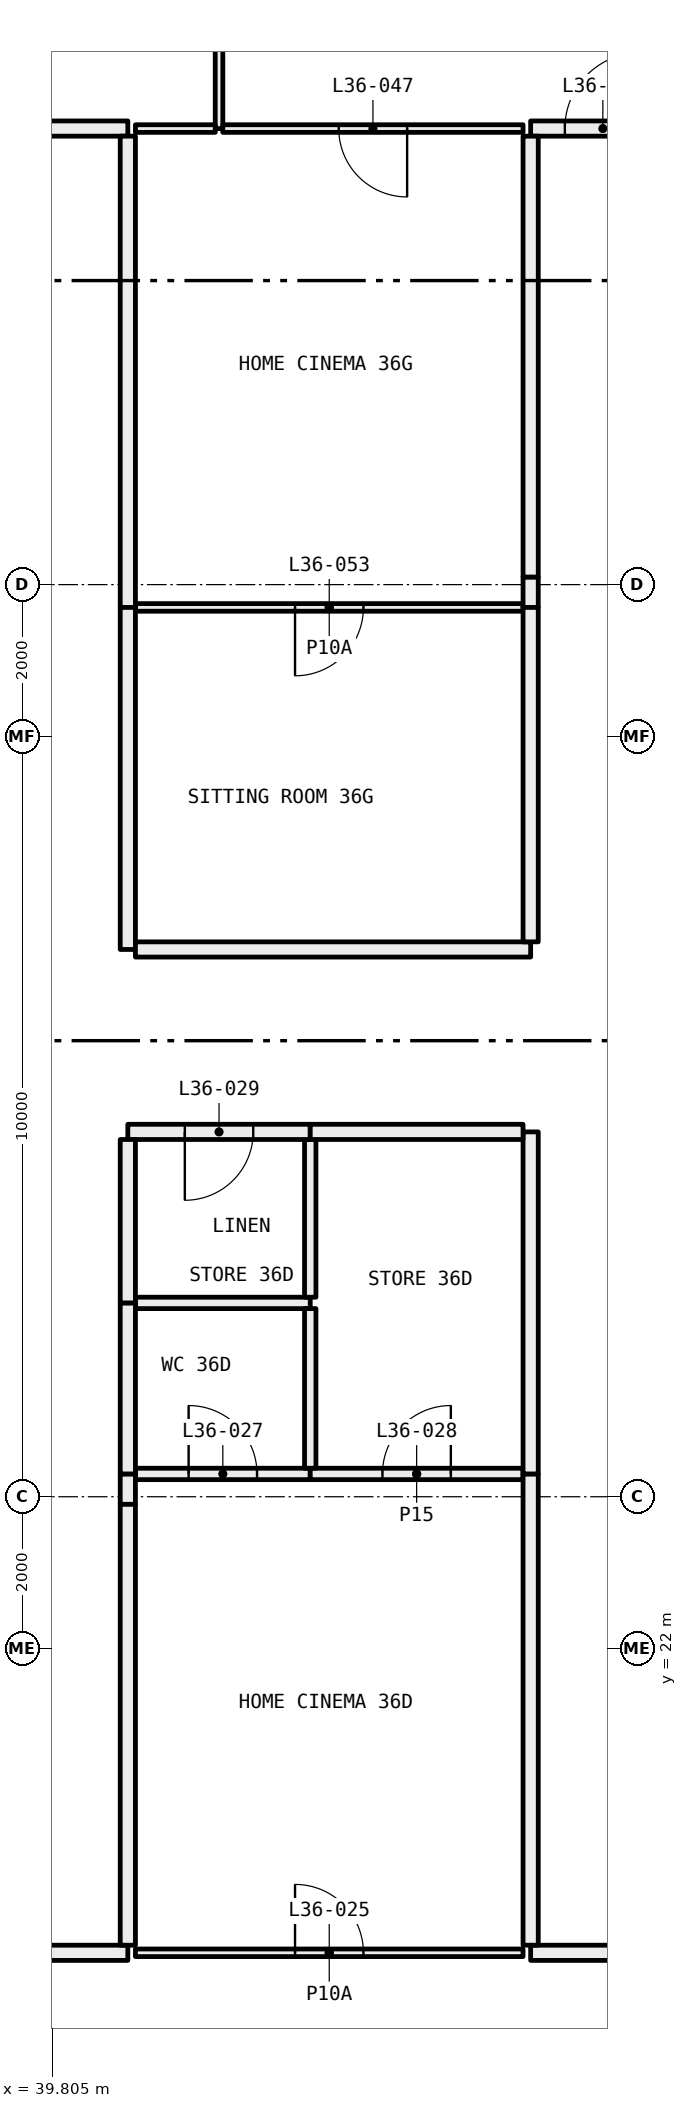
"""IFC4 building model, lengths in metres.
Left out: names, types, materials, properties, quantities, classifications, styles, units other than length and angle.
Written with IfcOpenShell. Run it as: python <this file> out.ifc"""

import sys

from ifc_helpers import new_model, si_unit, direction, frame, frame_2d, origin, place, context, subcontext, project, spatial, rectangle, extrude, element, fill, save


model = new_model("IFC4")
c1 = context("Model", 3, precision=1e-05, world=origin(), true_north=direction((0.0, 1.0)))
c2 = subcontext(c1, "Body", "Model", "MODEL_VIEW")
j1 = project(units=[si_unit("LENGTHUNIT", "METRE"), si_unit("PLANEANGLEUNIT", "RADIAN")], contexts=[c1])
p1 = place(None, origin())
s1 = spatial("IfcSite", under=j1, at=p1, CompositionType="ELEMENT")
p2 = place(p1, origin())
s2 = spatial("IfcBuilding", under=s1, at=p2, CompositionType="ELEMENT")
p3 = place(p2, frame((0.0, 0.0, 138.0)))
s3 = spatial("IfcBuildingStorey", under=s2, at=p3, CompositionType="ELEMENT", Elevation=138.0)
p4 = place(p3, frame((46.0, 18.0, 0.0), z_axis=(0.0, 0.0, 1.0), x_axis=(-1.0, 0.0, 0.0)))
e1 = element("IfcWall", 1, at=p4, inside=s3, PredefinedType="PARTITIONING", context=c2, shape_type="SweptSolid", body=[
    extrude(rectangle(XDim=5.1, YDim=0.1, at=frame_2d((2.55, 0.0))), origin(), (0.0, 0.0, 1.0), 3.05),
])
p5 = place(p4, frame((2.1, 0.0, 0.0)))
e2 = element("IfcOpeningElement", 2, at=p5, cuts=e1, PredefinedType="OPENING", context=c2, shape_type="SweptSolid", body=[
    extrude(rectangle(XDim=0.9, YDim=2.1, at=frame_2d((0.45, 1.05))), frame((0.0, 0.06, 0.0), z_axis=(0.0, -1.0, 0.0), x_axis=(1.0, 0.0, 0.0)), (0.0, 0.0, 1.0), 0.12),
])
p6 = place(p3, frame((40.8, 18.0, 0.0), z_axis=(0.0, 0.0, 1.0), x_axis=(-1.0, 0.0, 0.0)))
e3 = element("IfcWall", 3, at=p6, inside=s3, PredefinedType="PARTITIONING", context=c2, shape_type="SweptSolid", body=[
    extrude(rectangle(XDim=2.3, YDim=0.2, at=frame_2d((1.15, 0.0))), origin(), (0.0, 0.0, 1.0), 3.05),
])
p7 = place(p3, frame((48.0, 18.0, 0.0), z_axis=(0.0, 0.0, 1.0), x_axis=(-1.0, 0.0, 0.0)))
e4 = element("IfcWall", 4, at=p7, inside=s3, PredefinedType="PARTITIONING", context=c2, shape_type="SweptSolid", body=[
    extrude(rectangle(XDim=1.9, YDim=0.2, at=frame_2d((0.95, 0.0))), origin(), (0.0, 0.0, 1.0), 3.05),
])
p8 = place(p3, frame((43.2, 24.3, 0.0), z_axis=(0.0, 0.0, 1.0), x_axis=(-1.0, 0.0, 0.0)))
e5 = element("IfcWall", 5, at=p8, inside=s3, PredefinedType="PARTITIONING", context=c2, shape_type="SweptSolid", body=[
    extrude(rectangle(XDim=2.3, YDim=0.15, at=frame_2d((1.15, 0.0))), origin(), (0.0, 0.0, 1.0), 3.05),
])
p9 = place(p8, frame((0.7, 0.0, 0.0)))
e6 = element("IfcOpeningElement", 6, at=p9, cuts=e5, PredefinedType="OPENING", context=c2, shape_type="SweptSolid", body=[
    extrude(rectangle(XDim=0.9, YDim=2.1, at=frame_2d((0.45, 1.05))), frame((0.0, 0.085, 0.0), z_axis=(0.0, -1.0, 0.0), x_axis=(1.0, 0.0, 0.0)), (0.0, 0.0, 1.0), 0.17),
])
p10 = place(p3, frame((46.0, 24.3, 0.0), z_axis=(0.0, 0.0, 1.0), x_axis=(-1.0, 0.0, 0.0)))
e7 = element("IfcWall", 7, at=p10, inside=s3, PredefinedType="PARTITIONING", context=c2, shape_type="SweptSolid", body=[
    extrude(rectangle(XDim=2.8, YDim=0.15, at=frame_2d((1.4, 0.0))), origin(), (0.0, 0.0, 1.0), 3.05),
])
p11 = place(p10, frame((0.95, 0.0, 0.0)))
e8 = element("IfcOpeningElement", 8, at=p11, cuts=e7, PredefinedType="OPENING", context=c2, shape_type="SweptSolid", body=[
    extrude(rectangle(XDim=0.9, YDim=2.1, at=frame_2d((0.45, 1.05))), frame((0.0, 0.085, 0.0), z_axis=(0.0, -1.0, 0.0), x_axis=(1.0, 0.0, 0.0)), (0.0, 0.0, 1.0), 0.17),
])
p12 = place(p3, frame((40.8, 24.3, 0.0), z_axis=(0.0, 0.0, 1.0), x_axis=(0.0, -1.0, 0.0)))
e9 = element("IfcWall", 9, at=p12, inside=s3, PredefinedType="PARTITIONING", context=c2, shape_type="SweptSolid", body=[
    extrude(rectangle(XDim=0.4, YDim=0.2, at=frame_2d((0.2, 0.0))), origin(), (0.0, 0.0, 1.0), 2.45),
])
p13 = place(p3, frame((40.8, 23.9, 0.0), z_axis=(0.0, 0.0, 1.0), x_axis=(0.0, -1.0, 0.0)))
e10 = element("IfcWall", 10, at=p13, inside=s3, PredefinedType="PARTITIONING", context=c2, shape_type="SweptSolid", body=[
    extrude(rectangle(XDim=5.8, YDim=0.2, at=frame_2d((2.9, 0.0))), origin(), (0.0, 0.0, 1.0), 3.05),
])
p14 = place(p3, frame((46.1, 18.1, 0.0), z_axis=(0.0, 0.0, 1.0), x_axis=(0.0, 1.0, 0.0)))
e11 = element("IfcWall", 11, at=p14, inside=s3, PredefinedType="PARTITIONING", context=c2, shape_type="SweptSolid", body=[
    extrude(rectangle(XDim=6.2, YDim=0.2, at=frame_2d((3.1, 0.0))), origin(), (0.0, 0.0, 1.0), 2.45),
])
p15 = place(p3, frame((43.2, 26.55, 0.0), z_axis=(0.0, 0.0, 1.0), x_axis=(-1.0, 0.0, 0.0)))
e12 = element("IfcWall", 12, at=p15, inside=s3, PredefinedType="PARTITIONING", context=c2, shape_type="SweptSolid", body=[
    extrude(rectangle(XDim=2.3, YDim=0.15, at=frame_2d((1.15, 0.0))), origin(), (0.0, 0.0, 1.0), 3.05),
])
p16 = place(p3, frame((43.2, 24.375, 0.0), z_axis=(0.0, 0.0, 1.0), x_axis=(0.0, 1.0, 0.0)))
e13 = element("IfcWall", 13, at=p16, inside=s3, PredefinedType="PARTITIONING", context=c2, shape_type="SweptSolid", body=[
    extrude(rectangle(XDim=2.1, YDim=0.15, at=frame_2d((1.05, 0.0))), origin(), (0.0, 0.0, 1.0), 3.05),
])
p17 = place(p3, frame((40.8, 26.55, 0.0), z_axis=(0.0, 0.0, 1.0), x_axis=(0.0, -1.0, 0.0)))
e14 = element("IfcWall", 14, at=p17, inside=s3, PredefinedType="PARTITIONING", context=c2, shape_type="SweptSolid", body=[
    extrude(rectangle(XDim=2.25, YDim=0.2, at=frame_2d((1.125, 0.0))), origin(), (0.0, 0.0, 1.0), 3.05),
])
p18 = place(p3, frame((43.2, 26.625, 0.0), z_axis=(0.0, 0.0, 1.0), x_axis=(0.0, 1.0, 0.0)))
e15 = element("IfcWall", 15, at=p18, inside=s3, PredefinedType="PARTITIONING", context=c2, shape_type="SweptSolid", body=[
    extrude(rectangle(XDim=2.075, YDim=0.15, at=frame_2d((1.038, 0.0))), origin(), (0.0, 0.0, 1.0), 3.05),
])
p19 = place(p3, frame((43.2, 28.8, 0.0), z_axis=(0.0, 0.0, 1.0), x_axis=(-1.0, 0.0, 0.0)))
e16 = element("IfcWall", 16, at=p19, inside=s3, PredefinedType="PARTITIONING", context=c2, shape_type="SweptSolid", body=[
    extrude(rectangle(XDim=2.4, YDim=0.2, at=frame_2d((1.2, 0.0))), origin(), (0.0, 0.0, 1.0), 3.05),
])
p20 = place(p19, frame((0.75, 0.0, 0.0)))
e17 = element("IfcOpeningElement", 17, at=p20, cuts=e16, PredefinedType="OPENING", context=c2, shape_type="SweptSolid", body=[
    extrude(rectangle(XDim=0.9, YDim=2.1, at=frame_2d((0.45, 1.05))), frame((0.0, 0.11, 0.0), z_axis=(0.0, -1.0, 0.0), x_axis=(1.0, 0.0, 0.0)), (0.0, 0.0, 1.0), 0.22),
])
p21 = place(p3, frame((40.8, 28.7, 0.0), z_axis=(0.0, 0.0, 1.0), x_axis=(0.0, -1.0, 0.0)))
e18 = element("IfcWall", 18, at=p21, inside=s3, PredefinedType="PARTITIONING", context=c2, shape_type="SweptSolid", body=[
    extrude(rectangle(XDim=2.15, YDim=0.2, at=frame_2d((1.075, 0.0))), origin(), (0.0, 0.0, 1.0), 3.05),
])
p22 = place(p3, frame((46.1, 24.3, 0.0), z_axis=(0.0, 0.0, 1.0), x_axis=(0.0, 1.0, 0.0)))
e19 = element("IfcWall", 19, at=p22, inside=s3, PredefinedType="PARTITIONING", context=c2, shape_type="SweptSolid", body=[
    extrude(rectangle(XDim=4.5, YDim=0.2, at=frame_2d((2.25, 0.0))), origin(), (0.0, 0.0, 1.0), 3.05),
])
p23 = place(p3, frame((46.0, 28.8, 0.0), z_axis=(0.0, 0.0, 1.0), x_axis=(-1.0, 0.0, 0.0)))
e20 = element("IfcWall", 20, at=p23, inside=s3, PredefinedType="PARTITIONING", context=c2, shape_type="SweptSolid", body=[
    extrude(rectangle(XDim=2.8, YDim=0.2, at=frame_2d((1.4, 0.0))), origin(), (0.0, 0.0, 1.0), 3.05),
])
p24 = place(p3, frame((42.0, 42.0, 0.0), z_axis=(0.0, 0.0, 1.0), x_axis=(0.0, 1.0, 0.0)))
e21 = element("IfcWall", 21, at=p24, inside=s3, PredefinedType="PARTITIONING", context=c2, shape_type="SweptSolid", body=[
    extrude(rectangle(XDim=2.95, YDim=0.1, at=frame_2d((1.475, 0.0))), origin(), (0.0, 0.0, 1.0), 3.05),
])
p25 = place(p24, frame((1.025, 0.0, 0.0)))
e22 = element("IfcOpeningElement", 22, at=p25, cuts=e21, PredefinedType="OPENING", context=c2, shape_type="SweptSolid", body=[
    extrude(rectangle(XDim=0.9, YDim=2.1, at=frame_2d((0.45, 1.05))), frame((0.0, 0.06, 0.0), z_axis=(0.0, -1.0, 0.0), x_axis=(1.0, 0.0, 0.0)), (0.0, 0.0, 1.0), 0.12),
])
p26 = place(p3, frame((40.9, 42.0, 0.0), z_axis=(0.0, 0.0, 1.0), x_axis=(1.0, 0.0, 0.0)))
e23 = element("IfcWall", 23, at=p26, inside=s3, PredefinedType="PARTITIONING", context=c2, shape_type="SweptSolid", body=[
    extrude(rectangle(XDim=1.05, YDim=0.1, at=frame_2d((0.525, 0.0))), origin(), (0.0, 0.0, 1.0), 3.05),
])
p27 = place(p3, frame((38.4, 42.0, 0.0), z_axis=(0.0, 0.0, 1.0), x_axis=(1.0, 0.0, 0.0)))
e24 = element("IfcWall", 24, at=p27, inside=s3, PredefinedType="PARTITIONING", context=c2, shape_type="SweptSolid", body=[
    extrude(rectangle(XDim=2.4, YDim=0.2, at=frame_2d((1.2, 0.0))), origin(), (0.0, 0.0, 1.0), 3.05),
])
p28 = place(p3, frame((42.05, 42.0, 0.0), z_axis=(0.0, 0.0, 1.0), x_axis=(1.0, 0.0, 0.0)))
e25 = element("IfcWall", 25, at=p28, inside=s3, PredefinedType="PARTITIONING", context=c2, shape_type="SweptSolid", body=[
    extrude(rectangle(XDim=3.95, YDim=0.1, at=frame_2d((1.975, 0.0))), origin(), (0.0, 0.0, 1.0), 3.05),
])
p29 = place(p28, frame((1.525, 0.0, 0.0)))
e26 = element("IfcOpeningElement", 26, at=p29, cuts=e25, PredefinedType="OPENING", context=c2, shape_type="SweptSolid", body=[
    extrude(rectangle(XDim=0.9, YDim=2.1, at=frame_2d((0.45, 1.05))), frame((0.0, 0.06, 0.0), z_axis=(0.0, -1.0, 0.0), x_axis=(1.0, 0.0, 0.0)), (0.0, 0.0, 1.0), 0.12),
])
p30 = place(p3, frame((46.1, 42.0, 0.0), z_axis=(0.0, 0.0, 1.0), x_axis=(1.0, 0.0, 0.0)))
e27 = element("IfcWall", 27, at=p30, inside=s3, PredefinedType="PARTITIONING", context=c2, shape_type="SweptSolid", body=[
    extrude(rectangle(XDim=1.9, YDim=0.2, at=frame_2d((0.95, 0.0))), origin(), (0.0, 0.0, 1.0), 3.05),
])
p31 = place(p30, frame((0.45, 0.0, 0.0)))
e28 = element("IfcOpeningElement", 28, at=p31, cuts=e27, PredefinedType="OPENING", context=c2, shape_type="SweptSolid", body=[
    extrude(rectangle(XDim=1.0, YDim=2.1, at=frame_2d((0.5, 1.05))), frame((0.0, 0.11, 0.0), z_axis=(0.0, -1.0, 0.0), x_axis=(1.0, 0.0, 0.0)), (0.0, 0.0, 1.0), 0.22),
])
p32 = place(p3, frame((40.9, 35.7, 0.0), z_axis=(0.0, 0.0, 1.0), x_axis=(1.0, 0.0, 0.0)))
e29 = element("IfcWall", 29, at=p32, inside=s3, PredefinedType="PARTITIONING", context=c2, shape_type="SweptSolid", body=[
    extrude(rectangle(XDim=5.1, YDim=0.1, at=frame_2d((2.55, 0.0))), origin(), (0.0, 0.0, 1.0), 3.05),
])
p33 = place(p32, frame((2.1, 0.0, 0.0)))
e30 = element("IfcOpeningElement", 30, at=p33, cuts=e29, PredefinedType="OPENING", context=c2, shape_type="SweptSolid", body=[
    extrude(rectangle(XDim=0.9, YDim=2.1, at=frame_2d((0.45, 1.05))), frame((0.0, 0.06, 0.0), z_axis=(0.0, -1.0, 0.0), x_axis=(1.0, 0.0, 0.0)), (0.0, 0.0, 1.0), 0.12),
])
p34 = place(p3, frame((40.8, 41.9, 0.0), z_axis=(0.0, 0.0, 1.0), x_axis=(0.0, -1.0, 0.0)))
e31 = element("IfcWall", 31, at=p34, inside=s3, PredefinedType="PARTITIONING", context=c2, shape_type="SweptSolid", body=[
    extrude(rectangle(XDim=6.2, YDim=0.2, at=frame_2d((3.1, 0.0))), origin(), (0.0, 0.0, 1.0), 2.45),
])
p35 = place(p3, frame((46.1, 35.7, 0.0), z_axis=(0.0, 0.0, 1.0), x_axis=(0.0, 1.0, 0.0)))
e32 = element("IfcWall", 32, at=p35, inside=s3, PredefinedType="PARTITIONING", context=c2, shape_type="SweptSolid", body=[
    extrude(rectangle(XDim=0.4, YDim=0.2, at=frame_2d((0.2, 0.0))), origin(), (0.0, 0.0, 1.0), 2.45),
])
p36 = place(p3, frame((46.1, 36.1, 0.0), z_axis=(0.0, 0.0, 1.0), x_axis=(0.0, 1.0, 0.0)))
e33 = element("IfcWall", 33, at=p36, inside=s3, PredefinedType="PARTITIONING", context=c2, shape_type="SweptSolid", body=[
    extrude(rectangle(XDim=5.8, YDim=0.2, at=frame_2d((2.9, 0.0))), origin(), (0.0, 0.0, 1.0), 3.05),
])
p37 = place(p3, frame((40.8, 35.7, 0.0), z_axis=(0.0, 0.0, 1.0), x_axis=(0.0, -1.0, 0.0)))
e34 = element("IfcWall", 34, at=p37, inside=s3, PredefinedType="PARTITIONING", context=c2, shape_type="SweptSolid", body=[
    extrude(rectangle(XDim=4.5, YDim=0.2, at=frame_2d((2.25, 0.0))), origin(), (0.0, 0.0, 1.0), 3.05),
])
p38 = place(p3, frame((40.9, 31.2, 0.0), z_axis=(0.0, 0.0, 1.0), x_axis=(1.0, 0.0, 0.0)))
e35 = element("IfcWall", 35, at=p38, inside=s3, PredefinedType="PARTITIONING", context=c2, shape_type="SweptSolid", body=[
    extrude(rectangle(XDim=5.2, YDim=0.2, at=frame_2d((2.6, 0.0))), origin(), (0.0, 0.0, 1.0), 3.05),
])
p39 = place(p3, frame((46.1, 31.3, 0.0), z_axis=(0.0, 0.0, 1.0), x_axis=(0.0, 1.0, 0.0)))
e36 = element("IfcWall", 36, at=p39, inside=s3, PredefinedType="PARTITIONING", context=c2, shape_type="SweptSolid", body=[
    extrude(rectangle(XDim=4.4, YDim=0.2, at=frame_2d((2.2, 0.0))), origin(), (0.0, 0.0, 1.0), 3.05),
])
p40 = place(p5, frame((0.9, 0.0, 0.0), x_axis=(-1.0, 0.0, 0.0)))
e37 = element("IfcDoor", 37, at=p40, inside=s3, OperationType="SINGLE_SWING_RIGHT", PredefinedType="DOOR", context=c2, shape_type="SweptSolid", body=[
    extrude(rectangle(XDim=0.9, YDim=2.1, at=frame_2d((0.45, 1.05))), frame((0.0, 0.025, 0.0), z_axis=(0.0, -1.0, 0.0), x_axis=(1.0, 0.0, 0.0)), (0.0, 0.0, 1.0), 0.05),
])
fill(e2, e37)
p41 = place(p9, frame((0.9, 0.0, 0.0), x_axis=(-1.0, 0.0, 0.0)))
e38 = element("IfcDoor", 38, at=p41, inside=s3, OperationType="SINGLE_SWING_RIGHT", PredefinedType="DOOR", context=c2, shape_type="SweptSolid", body=[
    extrude(rectangle(XDim=0.9, YDim=2.1, at=frame_2d((0.45, 1.05))), frame((0.0, 0.025, 0.0), z_axis=(0.0, -1.0, 0.0), x_axis=(1.0, 0.0, 0.0)), (0.0, 0.0, 1.0), 0.05),
])
fill(e6, e38)
p42 = place(p11, frame((0.9, 0.0, 0.0), x_axis=(-1.0, 0.0, 0.0)))
e39 = element("IfcDoor", 39, at=p42, inside=s3, OperationType="SINGLE_SWING_LEFT", PredefinedType="DOOR", context=c2, shape_type="SweptSolid", body=[
    extrude(rectangle(XDim=0.9, YDim=2.1, at=frame_2d((0.45, 1.05))), frame((0.0, 0.025, 0.0), z_axis=(0.0, -1.0, 0.0), x_axis=(1.0, 0.0, 0.0)), (0.0, 0.0, 1.0), 0.05),
])
fill(e8, e39)
p43 = place(p20, origin())
e40 = element("IfcDoor", 40, at=p43, inside=s3, OperationType="SINGLE_SWING_LEFT", PredefinedType="DOOR", context=c2, shape_type="SweptSolid", body=[
    extrude(rectangle(XDim=0.9, YDim=2.1, at=frame_2d((0.45, 1.05))), frame((0.0, 0.025, 0.0), z_axis=(0.0, -1.0, 0.0), x_axis=(1.0, 0.0, 0.0)), (0.0, 0.0, 1.0), 0.05),
])
fill(e17, e40)
p44 = place(p31, origin())
e41 = element("IfcDoor", 41, at=p44, inside=s3, OperationType="SINGLE_SWING_LEFT", PredefinedType="DOOR", context=c2, shape_type="SweptSolid", body=[
    extrude(rectangle(XDim=1.0, YDim=2.1, at=frame_2d((0.5, 1.05))), frame((0.0, 0.025, 0.0), z_axis=(0.0, -1.0, 0.0), x_axis=(1.0, 0.0, 0.0)), (0.0, 0.0, 1.0), 0.05),
])
fill(e28, e41)
p45 = place(p29, frame((0.9, 0.0, 0.0), x_axis=(-1.0, 0.0, 0.0)))
e42 = element("IfcDoor", 42, at=p45, inside=s3, OperationType="SINGLE_SWING_RIGHT", PredefinedType="DOOR", context=c2, shape_type="SweptSolid", body=[
    extrude(rectangle(XDim=0.9, YDim=2.1, at=frame_2d((0.45, 1.05))), frame((0.0, 0.025, 0.0), z_axis=(0.0, -1.0, 0.0), x_axis=(1.0, 0.0, 0.0)), (0.0, 0.0, 1.0), 0.05),
])
fill(e26, e42)
p46 = place(p33, frame((0.9, 0.0, 0.0), x_axis=(-1.0, 0.0, 0.0)))
e43 = element("IfcDoor", 43, at=p46, inside=s3, OperationType="SINGLE_SWING_LEFT", PredefinedType="DOOR", context=c2, shape_type="SweptSolid", body=[
    extrude(rectangle(XDim=0.9, YDim=2.1, at=frame_2d((0.45, 1.05))), frame((0.0, 0.025, 0.0), z_axis=(0.0, -1.0, 0.0), x_axis=(1.0, 0.0, 0.0)), (0.0, 0.0, 1.0), 0.05),
])
fill(e30, e43)
save(model, sys.argv[1])
